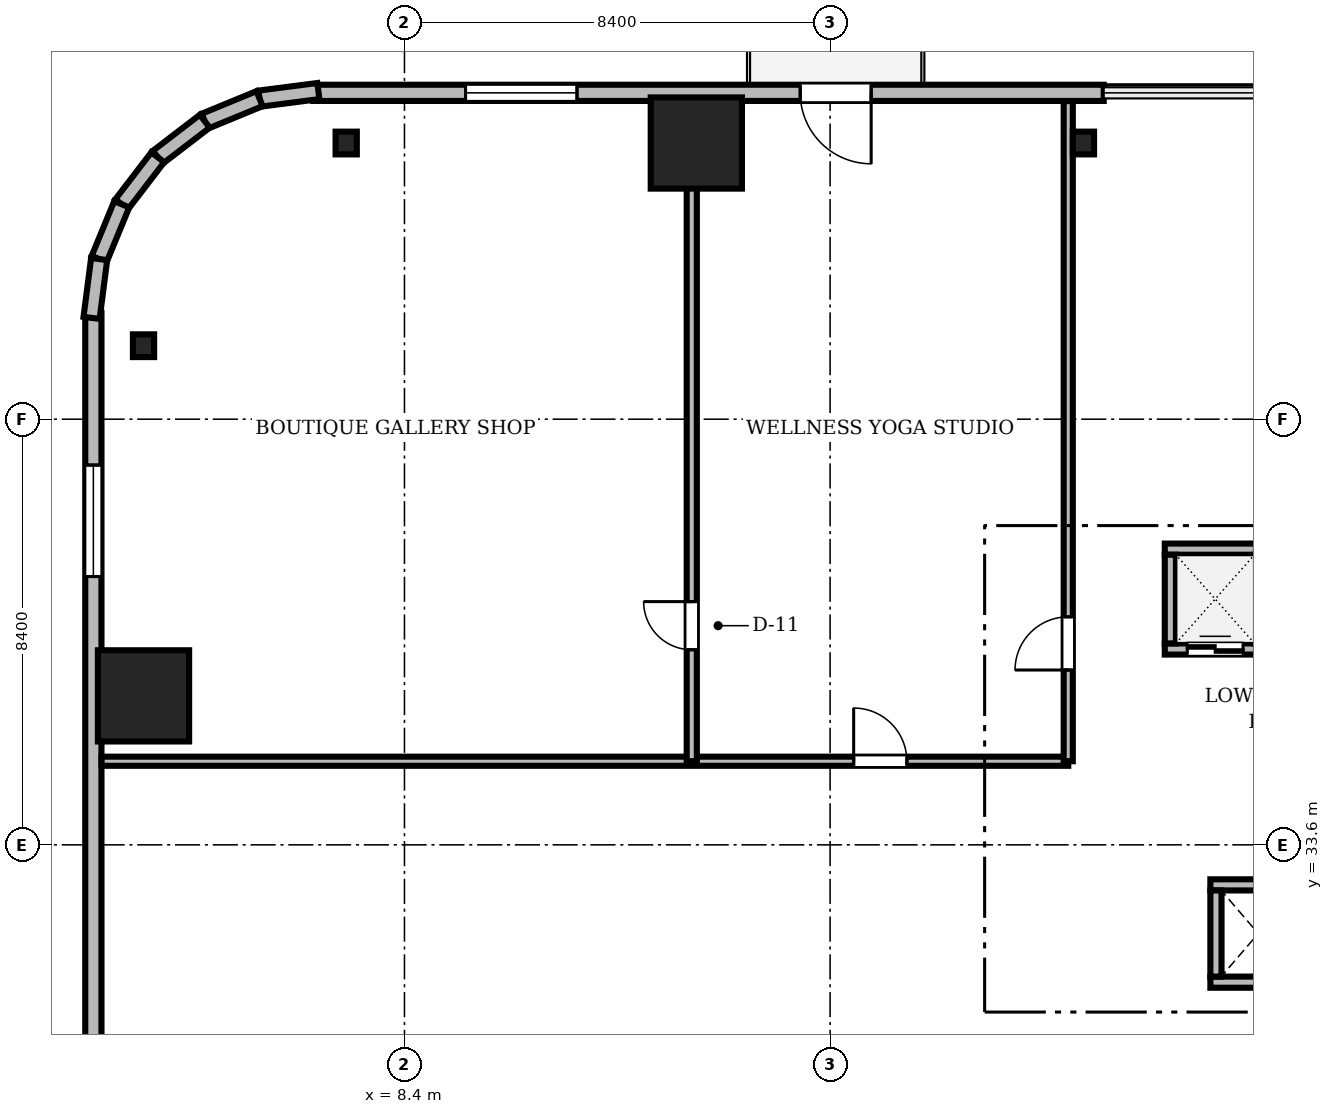
"""IFC4 building model, lengths in metres.
Left out: names, types, materials, properties, quantities, classifications, styles, units other than length and angle.
Written with IfcOpenShell. Run it as: python <this file> out.ifc"""

import sys

from ifc_helpers import new_model, si_unit, direction, frame, frame_2d, origin, origin_2d, place, context, subcontext, project, spatial, rectangle, i_section, extrude, source, transform, mapped, element, fill, save


model = new_model("IFC4")
c1 = context("Model", 3, precision=1e-05, world=origin(), true_north=direction((0.0, 1.0)))
c2 = subcontext(c1, "Body", "Model", "MODEL_VIEW")
j1 = project(units=[si_unit("LENGTHUNIT", "METRE"), si_unit("PLANEANGLEUNIT", "RADIAN")], contexts=[c1])
p1 = place(None, origin())
s1 = spatial("IfcSite", under=j1, at=p1, CompositionType="ELEMENT")
p2 = place(p1, origin())
s2 = spatial("IfcBuilding", under=s1, at=p2, CompositionType="ELEMENT")
p3 = place(p2, frame((0.0, 0.0, 45.85)))
s3 = spatial("IfcBuildingStorey", under=s2, at=p3, CompositionType="ELEMENT", Elevation=45.85)
m1 = source(origin(), c2, "Body", "SweptSolid", [
    extrude(rectangle(XDim=1.8, YDim=1.8, at=origin_2d()), origin(), (0.0, 0.0, 1.0), 3.41),
])
for number, where, z_axis, x_axis in (
    (1, (14.16, 47.45, 0.0), (0.0, 0.0, 1.0), (1.0, 0.0, 0.0)),
    (2, (3.25, 36.54, 0.0), (0.0, 0.0, 1.0), (1.0, 0.0, 0.0)),
):
    element("IfcColumn", number, at=place(p3, frame(where, z_axis=z_axis, x_axis=x_axis)), inside=s3, PredefinedType="COLUMN", context=c2, shape_type="MappedRepresentation", body=[
        mapped(m1, transform((0.0, 0.0, 0.0), scale=1.0)),
    ])
m2 = source(origin(), c2, "Body", "SweptSolid", [
    extrude(i_section(OverallWidth=0.419, OverallDepth=0.449, WebThickness=0.031, FlangeThickness=0.048, FilletRadius=0.015, at=origin_2d()), origin(), (0.0, 0.0, 1.0), 3.41),
])
for number, where, z_axis, x_axis in (
    (3, (21.8, 47.45, 0.0), (0.0, 0.0, 1.0), (1.0, 0.0, 0.0)),
    (4, (7.25, 47.45, 0.0), (0.0, 0.0, 1.0), (1.0, 0.0, 0.0)),
    (5, (3.25, 43.45, 0.0), (0.0, 0.0, 1.0), (1.0, 0.0, 0.0)),
):
    element("IfcColumn", number, at=place(p3, frame(where, z_axis=z_axis, x_axis=x_axis)), inside=s3, PredefinedType="COLUMN", context=c2, shape_type="MappedRepresentation", body=[
        mapped(m2, transform((0.0, 0.0, 0.0), scale=1.0)),
    ])
m3 = source(origin(), c2, "Body", "SweptSolid", [
    extrude(rectangle(XDim=15.6, YDim=0.32, at=frame_2d((7.8, 0.0))), origin(), (0.0, 0.0, 1.0), 3.41),
])
p4 = place(p3, frame((22.2, 48.44, 0.0), z_axis=(0.0, 0.0, 1.0), x_axis=(-1.0, 0.0, 0.0)))
e6 = element("IfcWall", 6, at=p4, inside=s3, PredefinedType="SOLIDWALL", context=c2, shape_type="MappedRepresentation", body=[
    mapped(m3, transform((0.0, 0.0, 0.0), scale=1.0)),
])
m4 = source(origin(), c2, "Body", "SweptSolid", [
    extrude(rectangle(XDim=1.4, YDim=2.3, at=frame_2d((0.7, 1.15))), frame((0.0, 0.17, 0.0), z_axis=(0.0, -1.0, 0.0), x_axis=(1.0, 0.0, 0.0)), (0.0, 0.0, 1.0), 0.34),
])
p5 = place(p4, frame((4.59, 0.0, 0.0)))
e7 = element("IfcOpeningElement", 7, at=p5, cuts=e6, PredefinedType="OPENING", context=c2, shape_type="MappedRepresentation", body=[
    mapped(m4, transform((0.0, 0.0, 0.0), scale=1.0)),
])
m5 = source(origin(), c2, "Body", "SweptSolid", [
    extrude(rectangle(XDim=2.2, YDim=2.4, at=frame_2d((1.1, 1.2))), frame((0.0, 0.17, 0.0), z_axis=(0.0, -1.0, 0.0), x_axis=(1.0, 0.0, 0.0)), (0.0, 0.0, 1.0), 0.34),
])
p6 = place(p4, frame((10.395, 0.0, 0.72)))
e8 = element("IfcOpeningElement", 8, at=p6, cuts=e6, PredefinedType="OPENING", context=c2, shape_type="MappedRepresentation", body=[
    mapped(m5, transform((0.0, 0.0, 0.0), scale=1.0)),
])
m6 = source(origin(), c2, "Body", "SweptSolid", [
    extrude(rectangle(XDim=15.6, YDim=0.32, at=frame_2d((7.8, 0.0))), origin(), (0.0, 0.0, 1.0), 3.41),
])
p7 = place(p3, frame((2.26, 44.1, 0.0), z_axis=(0.0, 0.0, 1.0), x_axis=(0.0, -1.0, 0.0)))
e9 = element("IfcWall", 9, at=p7, inside=s3, PredefinedType="SOLIDWALL", context=c2, shape_type="MappedRepresentation", body=[
    mapped(m6, transform((0.0, 0.0, 0.0), scale=1.0)),
])
p8 = place(p7, frame((3.005, 0.0, 0.72)))
e10 = element("IfcOpeningElement", 10, at=p8, cuts=e9, PredefinedType="OPENING", context=c2, shape_type="MappedRepresentation", body=[
    mapped(m5, transform((0.0, 0.0, 0.0), scale=1.0)),
])
m7 = source(origin(), c2, "Body", "SweptSolid", [
    extrude(rectangle(XDim=1.17, YDim=0.32, at=frame_2d((0.585, 0.0))), origin(), (0.0, 0.0, 1.0), 3.41),
])
p9 = place(p3, frame((6.7, 48.476, 0.0), z_axis=(0.0, 0.0, 1.0), x_axis=(-0.991735963317, -0.128295670475, 0.0)))
e11 = element("IfcWall", 11, at=p9, inside=s3, PredefinedType="SOLIDWALL", context=c2, shape_type="MappedRepresentation", body=[
    mapped(m7, transform((0.0, 0.0, 0.0), scale=1.0)),
])
m8 = source(origin(), c2, "Body", "SweptSolid", [
    extrude(rectangle(XDim=1.169, YDim=0.32, at=frame_2d((0.584, 0.0))), origin(), (0.0, 0.0, 1.0), 3.41),
])
p10 = place(p3, frame((5.54, 48.325, 0.0), z_axis=(0.0, 0.0, 1.0), x_axis=(-0.924552646638, -0.381054331552, 0.0)))
e12 = element("IfcWall", 12, at=p10, inside=s3, PredefinedType="SOLIDWALL", context=c2, shape_type="MappedRepresentation", body=[
    mapped(m8, transform((0.0, 0.0, 0.0), scale=1.0)),
])
m9 = source(origin(), c2, "Body", "SweptSolid", [
    extrude(rectangle(XDim=1.169, YDim=0.32, at=frame_2d((0.584, 0.0))), origin(), (0.0, 0.0, 1.0), 3.41),
])
p11 = place(p3, frame((4.459, 47.88, 0.0), z_axis=(0.0, 0.0, 1.0), x_axis=(-0.793663520347, -0.608356981114, 0.0)))
e13 = element("IfcWall", 13, at=p11, inside=s3, PredefinedType="SOLIDWALL", context=c2, shape_type="MappedRepresentation", body=[
    mapped(m9, transform((0.0, 0.0, 0.0), scale=1.0)),
])
m10 = source(origin(), c2, "Body", "SweptSolid", [
    extrude(rectangle(XDim=1.169, YDim=0.32, at=frame_2d((0.584, 0.0))), origin(), (0.0, 0.0, 1.0), 3.41),
])
p12 = place(p3, frame((3.531, 47.169, 0.0), z_axis=(0.0, 0.0, 1.0), x_axis=(-0.608387696831, -0.793639975269, 0.0)))
e14 = element("IfcWall", 14, at=p12, inside=s3, PredefinedType="SOLIDWALL", context=c2, shape_type="MappedRepresentation", body=[
    mapped(m10, transform((0.0, 0.0, 0.0), scale=1.0)),
])
p13 = place(p3, frame((2.82, 46.241, 0.0), z_axis=(0.0, 0.0, 1.0), x_axis=(-0.381054331552, -0.924552646638, 0.0)))
e15 = element("IfcWall", 15, at=p13, inside=s3, PredefinedType="SOLIDWALL", context=c2, shape_type="MappedRepresentation", body=[
    mapped(m8, transform((0.0, 0.0, 0.0), scale=1.0)),
])
p14 = place(p3, frame((2.375, 45.16, 0.0), z_axis=(0.0, 0.0, 1.0), x_axis=(-0.128295670475, -0.991735963317, 0.0)))
e16 = element("IfcWall", 16, at=p14, inside=s3, PredefinedType="SOLIDWALL", context=c2, shape_type="MappedRepresentation", body=[
    mapped(m7, transform((0.0, 0.0, 0.0), scale=1.0)),
])
m11 = source(origin(), c2, "Body", "SweptSolid", [
    extrude(rectangle(XDim=1.99, YDim=0.22, at=frame_2d((0.995, 0.0))), origin(), (0.0, 0.0, 1.0), 3.41),
])
p15 = place(p3, frame((23.405, 37.465, 0.0), z_axis=(0.0, 0.0, 1.0), x_axis=(1.0, 0.0, 0.0)))
e17 = element("IfcWall", 17, at=p15, inside=s3, PredefinedType="SOLIDWALL", context=c2, shape_type="MappedRepresentation", body=[
    mapped(m11, transform((0.0, 0.0, 0.0), scale=1.0)),
])
m12 = source(origin(), c2, "Body", "SweptSolid", [
    extrude(rectangle(XDim=1.1, YDim=2.2, at=frame_2d((0.55, 1.1))), frame((0.0, 0.12, 0.0), z_axis=(0.0, -1.0, 0.0), x_axis=(1.0, 0.0, 0.0)), (0.0, 0.0, 1.0), 0.24),
])
p16 = place(p15, frame((0.445, 0.0, 0.0)))
e18 = element("IfcOpeningElement", 18, at=p16, cuts=e17, PredefinedType="OPENING", context=c2, shape_type="MappedRepresentation", body=[
    mapped(m12, transform((0.0, 0.0, 0.0), scale=1.0)),
])
p17 = place(p3, frame((23.405, 39.435, 0.0), z_axis=(0.0, 0.0, 1.0), x_axis=(1.0, 0.0, 0.0)))
e19 = element("IfcWall", 19, at=p17, inside=s3, PredefinedType="SOLIDWALL", context=c2, shape_type="MappedRepresentation", body=[
    mapped(m11, transform((0.0, 0.0, 0.0), scale=1.0)),
])
m13 = source(origin(), c2, "Body", "SweptSolid", [
    extrude(rectangle(XDim=1.75, YDim=0.22, at=frame_2d((0.875, 0.0))), origin(), (0.0, 0.0, 1.0), 3.41),
])
p18 = place(p3, frame((23.515, 37.575, 0.0), z_axis=(0.0, 0.0, 1.0), x_axis=(0.0, 1.0, 0.0)))
e20 = element("IfcWall", 20, at=p18, inside=s3, PredefinedType="SOLIDWALL", context=c2, shape_type="MappedRepresentation", body=[
    mapped(m13, transform((0.0, 0.0, 0.0), scale=1.0)),
])
m14 = source(origin(), c2, "Body", "SweptSolid", [
    extrude(rectangle(XDim=1.89, YDim=0.22, at=frame_2d((0.945, 0.0))), origin(), (0.0, 0.0, 1.0), 3.41),
])
for number, where, z_axis, x_axis in (
    (21, (24.305, 30.89, 0.0), (0.0, 0.0, 1.0), (1.0, 0.0, 0.0)),
    (22, (24.305, 32.81, 0.0), (0.0, 0.0, 1.0), (1.0, 0.0, 0.0)),
):
    element("IfcWall", number, at=place(p3, frame(where, z_axis=z_axis, x_axis=x_axis)), inside=s3, PredefinedType="SOLIDWALL", context=c2, shape_type="MappedRepresentation", body=[
        mapped(m14, transform((0.0, 0.0, 0.0), scale=1.0)),
    ])
m15 = source(origin(), c2, "Body", "SweptSolid", [
    extrude(rectangle(XDim=1.7, YDim=0.22, at=frame_2d((0.85, 0.0))), origin(), (0.0, 0.0, 1.0), 3.41),
])
p19 = place(p3, frame((24.415, 31.0, 0.0), z_axis=(0.0, 0.0, 1.0), x_axis=(0.0, 1.0, 0.0)))
e23 = element("IfcWall", 23, at=p19, inside=s3, PredefinedType="SOLIDWALL", context=c2, shape_type="MappedRepresentation", body=[
    mapped(m15, transform((0.0, 0.0, 0.0), scale=1.0)),
])
m16 = source(origin(), c2, "Body", "SweptSolid", [
    extrude(rectangle(XDim=19.078, YDim=0.18, at=frame_2d((9.539, 0.0))), origin(), (0.0, 0.0, 1.0), 2.652),
])
p20 = place(p3, frame((2.422, 35.25, 0.0), z_axis=(0.0, 0.0, 1.0), x_axis=(1.0, 0.0, 0.0)))
e24 = element("IfcWall", 24, at=p20, inside=s3, PredefinedType="PARTITIONING", context=c2, shape_type="MappedRepresentation", body=[
    mapped(m16, transform((0.0, 0.0, 0.0), scale=1.0)),
])
m17 = source(origin(), c2, "Body", "SweptSolid", [
    extrude(rectangle(XDim=1.05, YDim=2.2, at=frame_2d((0.525, 1.1))), frame((0.0, 0.1, 0.0), z_axis=(0.0, -1.0, 0.0), x_axis=(1.0, 0.0, 0.0)), (0.0, 0.0, 1.0), 0.2),
])
p21 = place(p20, frame((14.843, 0.0, 0.0)))
e25 = element("IfcOpeningElement", 25, at=p21, cuts=e24, PredefinedType="OPENING", context=c2, shape_type="MappedRepresentation", body=[
    mapped(m17, transform((0.0, 0.0, 0.0), scale=1.0)),
])
m18 = source(origin(), c2, "Body", "SweptSolid", [
    extrude(rectangle(XDim=13.028, YDim=0.2, at=frame_2d((6.514, 0.0))), origin(), (0.0, 0.0, 1.0), 2.652),
])
p22 = place(p3, frame((14.07, 35.25, 0.0), z_axis=(0.0, 0.0, 1.0), x_axis=(0.0, 1.0, 0.0)))
e26 = element("IfcWall", 26, at=p22, inside=s3, PredefinedType="PARTITIONING", context=c2, shape_type="MappedRepresentation", body=[
    mapped(m18, transform((0.0, 0.0, 0.0), scale=1.0)),
])
m19 = source(origin(), c2, "Body", "SweptSolid", [
    extrude(rectangle(XDim=0.95, YDim=2.15, at=frame_2d((0.475, 1.075))), frame((0.0, 0.11, 0.0), z_axis=(0.0, -1.0, 0.0), x_axis=(1.0, 0.0, 0.0)), (0.0, 0.0, 1.0), 0.22),
])
p23 = place(p22, frame((2.2, 0.0, 0.0)))
e27 = element("IfcOpeningElement", 27, at=p23, cuts=e26, PredefinedType="OPENING", context=c2, shape_type="MappedRepresentation", body=[
    mapped(m19, transform((0.0, 0.0, 0.0), scale=1.0)),
])
m20 = source(origin(), c2, "Body", "SweptSolid", [
    extrude(rectangle(XDim=13.028, YDim=0.18, at=frame_2d((6.514, 0.0))), origin(), (0.0, 0.0, 1.0), 2.652),
])
p24 = place(p3, frame((21.5, 35.25, 0.0), z_axis=(0.0, 0.0, 1.0), x_axis=(0.0, 1.0, 0.0)))
e28 = element("IfcWall", 28, at=p24, inside=s3, PredefinedType="PARTITIONING", context=c2, shape_type="MappedRepresentation", body=[
    mapped(m20, transform((0.0, 0.0, 0.0), scale=1.0)),
])
p25 = place(p24, frame((1.8, 0.0, 0.0)))
e29 = element("IfcOpeningElement", 29, at=p25, cuts=e28, PredefinedType="OPENING", context=c2, shape_type="MappedRepresentation", body=[
    mapped(m17, transform((0.0, 0.0, 0.0), scale=1.0)),
])
m21 = source(origin(), c2, "Body", "SweptSolid", [
    extrude(rectangle(XDim=1.4, YDim=2.3, at=frame_2d((0.7, 1.15))), frame((0.0, 0.025, 0.0), z_axis=(0.0, -1.0, 0.0), x_axis=(1.0, 0.0, 0.0)), (0.0, 0.0, 1.0), 0.05),
])
p26 = place(p5, frame((1.4, 0.0, 0.0), z_axis=(0.0, 0.0, 1.0), x_axis=(-1.0, 0.0, 0.0)))
e30 = element("IfcDoor", 30, at=p26, inside=s3, OperationType="DOUBLE_DOOR_SLIDING", PredefinedType="DOOR", context=c2, shape_type="MappedRepresentation", body=[
    mapped(m21, transform((0.0, 0.0, 0.0), scale=1.0)),
])
fill(e7, e30)
m22 = source(origin(), c2, "Body", "SweptSolid", [
    extrude(rectangle(XDim=2.2, YDim=2.4, at=frame_2d((1.1, 1.2))), frame((0.0, 0.03, 0.0), z_axis=(0.0, -1.0, 0.0), x_axis=(1.0, 0.0, 0.0)), (0.0, 0.0, 1.0), 0.06),
])
p27 = place(p6, origin())
e31 = element("IfcWindow", 31, at=p27, inside=s3, PartitioningType="SINGLE_PANEL", PredefinedType="WINDOW", context=c2, shape_type="MappedRepresentation", body=[
    mapped(m22, transform((0.0, 0.0, 0.0), scale=1.0)),
])
fill(e8, e31)
p28 = place(p8, origin())
e32 = element("IfcWindow", 32, at=p28, inside=s3, PartitioningType="SINGLE_PANEL", PredefinedType="WINDOW", context=c2, shape_type="MappedRepresentation", body=[
    mapped(m22, transform((0.0, 0.0, 0.0), scale=1.0)),
])
fill(e10, e32)
m23 = source(origin(), c2, "Body", "SweptSolid", [
    extrude(rectangle(XDim=1.1, YDim=2.2, at=frame_2d((0.55, 1.1))), frame((0.0, 0.025, 0.0), z_axis=(0.0, -1.0, 0.0), x_axis=(1.0, 0.0, 0.0)), (0.0, 0.0, 1.0), 0.05),
])
p29 = place(p16, origin())
e33 = element("IfcDoor", 33, at=p29, inside=s3, OperationType="DOUBLE_DOOR_SLIDING", PredefinedType="DOOR", context=c2, shape_type="MappedRepresentation", body=[
    mapped(m23, transform((0.0, 0.0, 0.0), scale=1.0)),
])
fill(e18, e33)
m24 = source(origin(), c2, "Body", "SweptSolid", [
    extrude(rectangle(XDim=1.05, YDim=2.2, at=frame_2d((0.525, 1.1))), frame((0.0, 0.025, 0.0), z_axis=(0.0, -1.0, 0.0), x_axis=(1.0, 0.0, 0.0)), (0.0, 0.0, 1.0), 0.05),
])
p30 = place(p21, origin())
e34 = element("IfcDoor", 34, at=p30, inside=s3, OperationType="SINGLE_SWING_LEFT", PredefinedType="DOOR", context=c2, shape_type="MappedRepresentation", body=[
    mapped(m24, transform((0.0, 0.0, 0.0), scale=1.0)),
])
fill(e25, e34)
m25 = source(origin(), c2, "Body", "SweptSolid", [
    extrude(rectangle(XDim=0.95, YDim=2.15, at=frame_2d((0.475, 1.075))), frame((0.0, 0.025, 0.0), z_axis=(0.0, -1.0, 0.0), x_axis=(1.0, 0.0, 0.0)), (0.0, 0.0, 1.0), 0.05),
])
p31 = place(p23, origin())
e35 = element("IfcDoor", 35, at=p31, inside=s3, OperationType="SINGLE_SWING_RIGHT", PredefinedType="DOOR", context=c2, shape_type="MappedRepresentation", body=[
    mapped(m25, transform((0.0, 0.0, 0.0), scale=1.0)),
])
fill(e27, e35)
p32 = place(p25, origin())
e36 = element("IfcDoor", 36, at=p32, inside=s3, OperationType="SINGLE_SWING_LEFT", PredefinedType="DOOR", context=c2, shape_type="MappedRepresentation", body=[
    mapped(m24, transform((0.0, 0.0, 0.0), scale=1.0)),
])
fill(e29, e36)
save(model, sys.argv[1])
